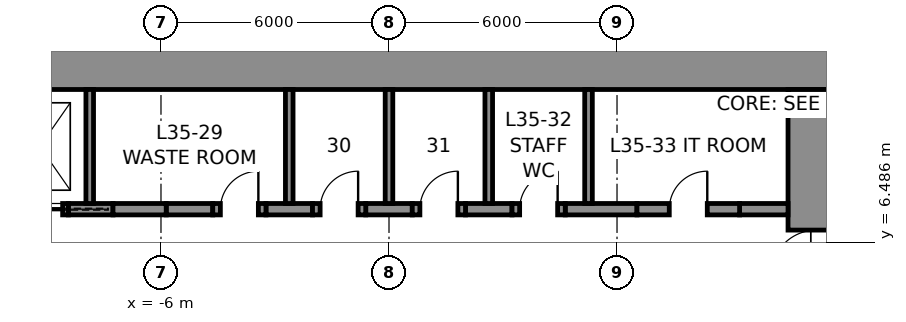
"""IFC4 building model, lengths in metres.
Left out: names, types, materials, properties, quantities, classifications, styles, units other than length and angle.
Written with IfcOpenShell. Run it as: python <this file> out.ifc"""

import sys

from ifc_helpers import new_model, si_unit, direction, frame, frame_2d, origin, place, context, subcontext, project, spatial, rectangle, extrude, element, fill, save


model = new_model("IFC4")
c1 = context("Model", 3, precision=1e-05, world=origin(), true_north=direction((0.0, 1.0)))
c2 = subcontext(c1, "Body", "Model", "MODEL_VIEW")
j1 = project(units=[si_unit("LENGTHUNIT", "METRE"), si_unit("PLANEANGLEUNIT", "RADIAN")], contexts=[c1])
p1 = place(None, origin())
s1 = spatial("IfcSite", under=j1, at=p1, CompositionType="ELEMENT")
p2 = place(p1, origin())
s2 = spatial("IfcBuilding", under=s1, at=p2, CompositionType="ELEMENT")
p3 = place(p2, frame((0.0, 0.0, 167.8)))
s3 = spatial("IfcBuildingStorey", under=s2, at=p3, CompositionType="ELEMENT", Elevation=167.8)
p4 = place(p3, frame((-12.0, 11.25, 0.0), z_axis=(0.0, 0.0, 1.0), x_axis=(1.0, 0.0, 0.0)))
e1 = element("IfcWall", 1, at=p4, inside=s3, PredefinedType="SHEAR", context=c2, shape_type="SweptSolid", body=[
    extrude(rectangle(XDim=24.0, YDim=1.5, at=frame_2d((12.0, 0.0))), origin(), (0.0, 0.0, 1.0), 4.0),
])
p5 = place(p3, frame((11.25, 10.5, 0.0), z_axis=(0.0, 0.0, 1.0), x_axis=(0.0, -1.0, 0.0)))
e2 = element("IfcWall", 2, at=p5, inside=s3, PredefinedType="SHEAR", context=c2, shape_type="SweptSolid", body=[
    extrude(rectangle(XDim=21.0, YDim=1.5, at=frame_2d((10.5, 0.0))), origin(), (0.0, 0.0, 1.0), 4.0),
])
p6 = place(p5, frame((3.7, 0.0, 0.0)))
e3 = element("IfcOpeningElement", 3, at=p6, cuts=e2, PredefinedType="OPENING", context=c2, shape_type="SweptSolid", body=[
    extrude(rectangle(XDim=1.2, YDim=2.3, at=frame_2d((0.6, 1.15))), frame((0.0, 0.76, 0.0), z_axis=(0.0, -1.0, 0.0), x_axis=(1.0, 0.0, 0.0)), (0.0, 0.0, 1.0), 1.52),
])
p7 = place(p5, frame((16.1, 0.0, 0.0)))
e4 = element("IfcOpeningElement", 4, at=p7, cuts=e2, PredefinedType="OPENING", context=c2, shape_type="SweptSolid", body=[
    extrude(rectangle(XDim=1.2, YDim=2.3, at=frame_2d((0.6, 1.15))), frame((0.0, 0.76, 0.0), z_axis=(0.0, -1.0, 0.0), x_axis=(1.0, 0.0, 0.0)), (0.0, 0.0, 1.0), 1.52),
])
p8 = place(p3, frame((-8.438, 7.35, 0.0), z_axis=(0.0, 0.0, 1.0), x_axis=(1.0, 0.0, 0.0)))
e5 = element("IfcWall", 5, at=p8, inside=s3, PredefinedType="SHEAR", context=c2, shape_type="SweptSolid", body=[
    extrude(rectangle(XDim=1.175, YDim=0.3, at=frame_2d((0.587, 0.0))), origin(), (0.0, 0.0, 1.0), 4.0),
])
for number, where, z_axis, x_axis in (
    (6, (-5.863, 7.35, 0.0), (0.0, 0.0, 1.0), (1.0, 0.0, 0.0)),
    (7, (-3.238, 7.35, 0.0), (0.0, 0.0, 1.0), (1.0, 0.0, 0.0)),
    (8, (-0.613, 7.35, 0.0), (0.0, 0.0, 1.0), (1.0, 0.0, 0.0)),
    (9, (2.012, 7.35, 0.0), (0.0, 0.0, 1.0), (1.0, 0.0, 0.0)),
):
    element("IfcWall", number, at=place(p3, frame(where, z_axis=z_axis, x_axis=x_axis)), inside=s3, PredefinedType="SHEAR", context=c2, shape_type="SweptSolid", body=[
        extrude(rectangle(XDim=1.225, YDim=0.3, at=frame_2d((0.613, 0.0))), origin(), (0.0, 0.0, 1.0), 4.0),
    ])
p9 = place(p3, frame((4.637, 7.35, 0.0), z_axis=(0.0, 0.0, 1.0), x_axis=(1.0, 0.0, 0.0)))
e10 = element("IfcWall", 10, at=p9, inside=s3, PredefinedType="SHEAR", context=c2, shape_type="SweptSolid", body=[
    extrude(rectangle(XDim=1.887, YDim=0.3, at=frame_2d((0.944, 0.0))), origin(), (0.0, 0.0, 1.0), 4.0),
])
p10 = place(p3, frame((9.225, 7.35, 0.0), z_axis=(0.0, 0.0, 1.0), x_axis=(1.0, 0.0, 0.0)))
e11 = element("IfcWall", 11, at=p10, inside=s3, PredefinedType="SHEAR", context=c2, shape_type="SweptSolid", body=[
    extrude(rectangle(XDim=1.275, YDim=0.3, at=frame_2d((0.637, 0.0))), origin(), (0.0, 0.0, 1.0), 4.0),
])
p11 = place(p3, frame((-9.938, 7.35, 0.0), z_axis=(0.0, 0.0, 1.0), x_axis=(1.0, 0.0, 0.0)))
e12 = element("IfcWall", 12, at=p11, inside=s3, PredefinedType="PARTITIONING", context=c2, shape_type="SweptSolid", body=[
    extrude(rectangle(XDim=1.5, YDim=0.3, at=frame_2d((0.75, 0.0))), origin(), (0.0, 0.0, 1.0), 4.0),
])
p12 = place(p11, frame((0.15, 0.0, 0.0)))
e13 = element("IfcOpeningElement", 13, at=p12, cuts=e12, PredefinedType="OPENING", context=c2, shape_type="SweptSolid", body=[
    extrude(rectangle(XDim=1.2, YDim=2.3, at=frame_2d((0.6, 1.15))), frame((0.0, 0.16, 0.0), z_axis=(0.0, -1.0, 0.0), x_axis=(1.0, 0.0, 0.0)), (0.0, 0.0, 1.0), 0.32),
])
p13 = place(p3, frame((-7.262, 7.35, 0.0), z_axis=(0.0, 0.0, 1.0), x_axis=(1.0, 0.0, 0.0)))
e14 = element("IfcWall", 14, at=p13, inside=s3, PredefinedType="PARTITIONING", context=c2, shape_type="SweptSolid", body=[
    extrude(rectangle(XDim=1.4, YDim=0.3, at=frame_2d((0.7, 0.0))), origin(), (0.0, 0.0, 1.0), 4.0),
])
p14 = place(p3, frame((-4.637, 7.35, 0.0), z_axis=(0.0, 0.0, 1.0), x_axis=(1.0, 0.0, 0.0)))
e15 = element("IfcWall", 15, at=p14, inside=s3, PredefinedType="PARTITIONING", context=c2, shape_type="SweptSolid", body=[
    extrude(rectangle(XDim=1.4, YDim=0.3, at=frame_2d((0.7, 0.0))), origin(), (0.0, 0.0, 1.0), 4.0),
])
p15 = place(p14, frame((0.2, 0.0, 0.0)))
e16 = element("IfcOpeningElement", 16, at=p15, cuts=e15, PredefinedType="OPENING", context=c2, shape_type="SweptSolid", body=[
    extrude(rectangle(XDim=1.0, YDim=2.3, at=frame_2d((0.5, 1.15))), frame((0.0, 0.16, 0.0), z_axis=(0.0, -1.0, 0.0), x_axis=(1.0, 0.0, 0.0)), (0.0, 0.0, 1.0), 0.32),
])
p16 = place(p3, frame((-2.012, 7.35, 0.0), z_axis=(0.0, 0.0, 1.0), x_axis=(1.0, 0.0, 0.0)))
e17 = element("IfcWall", 17, at=p16, inside=s3, PredefinedType="PARTITIONING", context=c2, shape_type="SweptSolid", body=[
    extrude(rectangle(XDim=1.4, YDim=0.3, at=frame_2d((0.7, 0.0))), origin(), (0.0, 0.0, 1.0), 4.0),
])
p17 = place(p16, frame((0.2, 0.0, 0.0)))
e18 = element("IfcOpeningElement", 18, at=p17, cuts=e17, PredefinedType="OPENING", context=c2, shape_type="SweptSolid", body=[
    extrude(rectangle(XDim=1.0, YDim=2.3, at=frame_2d((0.5, 1.15))), frame((0.0, 0.16, 0.0), z_axis=(0.0, -1.0, 0.0), x_axis=(1.0, 0.0, 0.0)), (0.0, 0.0, 1.0), 0.32),
])
p18 = place(p3, frame((0.613, 7.35, 0.0), z_axis=(0.0, 0.0, 1.0), x_axis=(1.0, 0.0, 0.0)))
e19 = element("IfcWall", 19, at=p18, inside=s3, PredefinedType="PARTITIONING", context=c2, shape_type="SweptSolid", body=[
    extrude(rectangle(XDim=1.4, YDim=0.3, at=frame_2d((0.7, 0.0))), origin(), (0.0, 0.0, 1.0), 4.0),
])
p19 = place(p18, frame((0.2, 0.0, 0.0)))
e20 = element("IfcOpeningElement", 20, at=p19, cuts=e19, PredefinedType="OPENING", context=c2, shape_type="SweptSolid", body=[
    extrude(rectangle(XDim=1.0, YDim=2.3, at=frame_2d((0.5, 1.15))), frame((0.0, 0.16, 0.0), z_axis=(0.0, -1.0, 0.0), x_axis=(1.0, 0.0, 0.0)), (0.0, 0.0, 1.0), 0.32),
])
p20 = place(p3, frame((3.238, 7.35, 0.0), z_axis=(0.0, 0.0, 1.0), x_axis=(1.0, 0.0, 0.0)))
e21 = element("IfcWall", 21, at=p20, inside=s3, PredefinedType="PARTITIONING", context=c2, shape_type="SweptSolid", body=[
    extrude(rectangle(XDim=1.4, YDim=0.3, at=frame_2d((0.7, 0.0))), origin(), (0.0, 0.0, 1.0), 4.0),
])
p21 = place(p20, frame((0.2, 0.0, 0.0)))
e22 = element("IfcOpeningElement", 22, at=p21, cuts=e21, PredefinedType="OPENING", context=c2, shape_type="SweptSolid", body=[
    extrude(rectangle(XDim=1.0, YDim=2.3, at=frame_2d((0.5, 1.15))), frame((0.0, 0.16, 0.0), z_axis=(0.0, -1.0, 0.0), x_axis=(1.0, 0.0, 0.0)), (0.0, 0.0, 1.0), 0.32),
])
p22 = place(p3, frame((6.525, 7.35, 0.0), z_axis=(0.0, 0.0, 1.0), x_axis=(1.0, 0.0, 0.0)))
e23 = element("IfcWall", 23, at=p22, inside=s3, PredefinedType="PARTITIONING", context=c2, shape_type="SweptSolid", body=[
    extrude(rectangle(XDim=2.7, YDim=0.3, at=frame_2d((1.35, 0.0))), origin(), (0.0, 0.0, 1.0), 4.0),
])
p23 = place(p22, frame((0.85, 0.0, 0.0)))
e24 = element("IfcOpeningElement", 24, at=p23, cuts=e23, PredefinedType="OPENING", context=c2, shape_type="SweptSolid", body=[
    extrude(rectangle(XDim=1.0, YDim=2.3, at=frame_2d((0.5, 1.15))), frame((0.0, 0.16, 0.0), z_axis=(0.0, -1.0, 0.0), x_axis=(1.0, 0.0, 0.0)), (0.0, 0.0, 1.0), 0.32),
])
for number, where, z_axis, x_axis in (
    (25, (-7.875, 7.5, 0.0), (0.0, 0.0, 1.0), (0.0, 1.0, 0.0)),
    (26, (-2.625, 7.5, 0.0), (0.0, 0.0, 1.0), (0.0, 1.0, 0.0)),
    (27, (0.0, 7.5, 0.0), (0.0, 0.0, 1.0), (0.0, 1.0, 0.0)),
    (28, (2.625, 7.5, 0.0), (0.0, 0.0, 1.0), (0.0, 1.0, 0.0)),
    (29, (5.25, 7.5, 0.0), (0.0, 0.0, 1.0), (0.0, 1.0, 0.0)),
):
    element("IfcWall", number, at=place(p3, frame(where, z_axis=z_axis, x_axis=x_axis)), inside=s3, PredefinedType="PARTITIONING", context=c2, shape_type="SweptSolid", body=[
        extrude(rectangle(XDim=3.0, YDim=0.2, at=frame_2d((1.5, 0.0))), origin(), (0.0, 0.0, 1.0), 4.0),
    ])
p24 = place(p15, origin())
e30 = element("IfcDoor", 30, at=p24, inside=s3, OperationType="SINGLE_SWING_RIGHT", PredefinedType="DOOR", context=c2, shape_type="SweptSolid", body=[
    extrude(rectangle(XDim=1.0, YDim=2.3, at=frame_2d((0.5, 1.15))), frame((0.0, 0.025, 0.0), z_axis=(0.0, -1.0, 0.0), x_axis=(1.0, 0.0, 0.0)), (0.0, 0.0, 1.0), 0.05),
])
fill(e16, e30)
p25 = place(p17, origin())
e31 = element("IfcDoor", 31, at=p25, inside=s3, OperationType="SINGLE_SWING_RIGHT", PredefinedType="DOOR", context=c2, shape_type="SweptSolid", body=[
    extrude(rectangle(XDim=1.0, YDim=2.3, at=frame_2d((0.5, 1.15))), frame((0.0, 0.025, 0.0), z_axis=(0.0, -1.0, 0.0), x_axis=(1.0, 0.0, 0.0)), (0.0, 0.0, 1.0), 0.05),
])
fill(e18, e31)
p26 = place(p19, origin())
e32 = element("IfcDoor", 32, at=p26, inside=s3, OperationType="SINGLE_SWING_RIGHT", PredefinedType="DOOR", context=c2, shape_type="SweptSolid", body=[
    extrude(rectangle(XDim=1.0, YDim=2.3, at=frame_2d((0.5, 1.15))), frame((0.0, 0.025, 0.0), z_axis=(0.0, -1.0, 0.0), x_axis=(1.0, 0.0, 0.0)), (0.0, 0.0, 1.0), 0.05),
])
fill(e20, e32)
p27 = place(p21, origin())
e33 = element("IfcDoor", 33, at=p27, inside=s3, OperationType="SINGLE_SWING_RIGHT", PredefinedType="DOOR", context=c2, shape_type="SweptSolid", body=[
    extrude(rectangle(XDim=1.0, YDim=2.3, at=frame_2d((0.5, 1.15))), frame((0.0, 0.025, 0.0), z_axis=(0.0, -1.0, 0.0), x_axis=(1.0, 0.0, 0.0)), (0.0, 0.0, 1.0), 0.05),
])
fill(e22, e33)
p28 = place(p23, origin())
e34 = element("IfcDoor", 34, at=p28, inside=s3, OperationType="SINGLE_SWING_RIGHT", PredefinedType="DOOR", context=c2, shape_type="SweptSolid", body=[
    extrude(rectangle(XDim=1.0, YDim=2.3, at=frame_2d((0.5, 1.15))), frame((0.0, 0.025, 0.0), z_axis=(0.0, -1.0, 0.0), x_axis=(1.0, 0.0, 0.0)), (0.0, 0.0, 1.0), 0.05),
])
fill(e24, e34)
p29 = place(p6, frame((1.2, 0.0, 0.0), z_axis=(0.0, 0.0, 1.0), x_axis=(-1.0, 0.0, 0.0)))
e35 = element("IfcDoor", 35, at=p29, inside=s3, OperationType="SINGLE_SWING_LEFT", PredefinedType="DOOR", context=c2, shape_type="SweptSolid", body=[
    extrude(rectangle(XDim=1.2, YDim=2.3, at=frame_2d((0.6, 1.15))), frame((0.0, 0.025, 0.0), z_axis=(0.0, -1.0, 0.0), x_axis=(1.0, 0.0, 0.0)), (0.0, 0.0, 1.0), 0.05),
])
fill(e3, e35)
p30 = place(p12, frame((1.2, 0.0, 0.0), z_axis=(0.0, 0.0, 1.0), x_axis=(-1.0, 0.0, 0.0)))
e36 = element("IfcDoor", 36, at=p30, inside=s3, OperationType="SLIDING_TO_LEFT", PredefinedType="DOOR", context=c2, shape_type="SweptSolid", body=[
    extrude(rectangle(XDim=1.2, YDim=2.3, at=frame_2d((0.6, 1.15))), frame((0.0, 0.025, 0.0), z_axis=(0.0, -1.0, 0.0), x_axis=(1.0, 0.0, 0.0)), (0.0, 0.0, 1.0), 0.05),
])
fill(e13, e36)
save(model, sys.argv[1])
